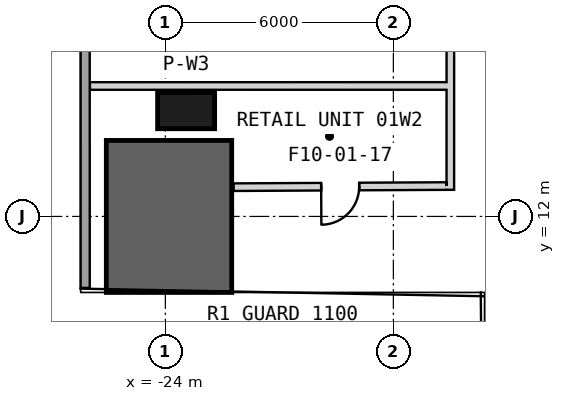
"""IFC4 building model, lengths in metres.
Left out: names, types, materials, properties, quantities, classifications, styles, units other than length and angle.
Written with IfcOpenShell. Run it as: python <this file> out.ifc"""

import sys

from ifc_helpers import new_model, si_unit, direction, frame, frame_2d, origin, origin_2d, place, context, subcontext, project, spatial, polyline, rectangle, outline, extrude, element, fill, save


model = new_model("IFC4")
c1 = context("Model", 3, precision=1e-05, world=origin(), true_north=direction((0.0, 1.0)))
c2 = subcontext(c1, "Body", "Model", "MODEL_VIEW")
j1 = project(units=[si_unit("LENGTHUNIT", "METRE"), si_unit("PLANEANGLEUNIT", "RADIAN")], contexts=[c1])
p1 = place(None, origin())
s1 = spatial("IfcSite", under=j1, at=p1, CompositionType="ELEMENT")
p2 = place(p1, origin())
s2 = spatial("IfcBuilding", under=s1, at=p2, CompositionType="ELEMENT")
p3 = place(p2, frame((0.0, 0.0, 9.0)))
s3 = spatial("IfcBuildingStorey", under=s2, at=p3, CompositionType="ELEMENT", Elevation=9.0)
p4 = place(p3, frame((-23.453, 14.783, 0.0), z_axis=(0.0, 0.0, 1.0), x_axis=(-1.0, 0.0, 0.0)))
e1 = element("IfcColumn", 1, at=p4, inside=s3, PredefinedType="COLUMN", context=c2, shape_type="SweptSolid", body=[
    extrude(rectangle(XDim=1.5, YDim=0.95, at=origin_2d()), origin(), (0.0, 0.0, 1.0), 6.5),
])
p5 = place(p3, origin())
e2 = element("IfcWall", 2, at=p5, inside=s3, PredefinedType="SHEAR", context=c2, shape_type="SweptSolid", body=[
    extrude(outline(polyline([(-25.553, 14.0), (-25.553, 10.0), (-22.253, 10.0), (-22.253, 14.0), (-25.553, 14.0)])), origin(), (0.0, 0.0, 1.0), 6.5),
])
p6 = place(p3, frame((-26.11, 20.685, 0.0), z_axis=(0.0, 0.0, 1.0), x_axis=(6.9319284e-05, -0.999999997597, 0.0)))
e3 = element("IfcWall", 3, at=p6, inside=s3, PredefinedType="SOLIDWALL", context=c2, shape_type="SweptSolid", body=[
    extrude(rectangle(XDim=10.566, YDim=0.24, at=frame_2d((5.283, 0.0))), origin(), (0.0, 0.0, 1.0), 6.2),
])
p7 = place(p3, frame((-16.5, 16.717, 0.0), z_axis=(0.0, 0.0, 1.0), x_axis=(-0.000303914404, -0.999999953818, 0.0)))
e4 = element("IfcWall", 4, at=p7, inside=s3, PredefinedType="PARTITIONING", context=c2, shape_type="SweptSolid", body=[
    extrude(rectangle(XDim=4.017, YDim=0.2, at=frame_2d((2.008, 0.0))), origin(), (0.0, 0.0, 1.0), 5.38),
])
p8 = place(p3, frame((-16.601, 12.8, 0.0), z_axis=(0.0, 0.0, 1.0), x_axis=(-0.999986096706, -0.005273176924, 0.0)))
e5 = element("IfcWall", 5, at=p8, inside=s3, PredefinedType="PARTITIONING", context=c2, shape_type="SweptSolid", body=[
    extrude(rectangle(XDim=5.602, YDim=0.2, at=frame_2d((2.801, 0.0))), origin(), (0.0, 0.0, 1.0), 5.67),
])
p9 = place(p8, frame((2.299, 0.0, 0.0)))
e6 = element("IfcOpeningElement", 6, at=p9, cuts=e5, PredefinedType="OPENING", context=c2, shape_type="SweptSolid", body=[
    extrude(rectangle(XDim=1.0, YDim=2.1, at=frame_2d((0.5, 1.05))), frame((0.0, 0.11, 0.0), z_axis=(0.0, -1.0, 0.0), x_axis=(1.0, 0.0, 0.0)), (0.0, 0.0, 1.0), 0.22),
])
p10 = place(p3, frame((-25.984, 15.432, 0.0), z_axis=(0.0, 0.0, 1.0), x_axis=(0.999999996954, 7.8047765e-05, 0.0)))
e7 = element("IfcWall", 7, at=p10, inside=s3, PredefinedType="PARTITIONING", context=c2, shape_type="SweptSolid", body=[
    extrude(rectangle(XDim=9.384, YDim=0.2, at=frame_2d((4.692, 0.0))), origin(), (0.0, 0.0, 1.0), 5.38),
])
p11 = place(p9, origin())
e8 = element("IfcDoor", 8, at=p11, inside=s3, OperationType="SINGLE_SWING_RIGHT", PredefinedType="USERDEFINED", context=c2, shape_type="SweptSolid", body=[
    extrude(rectangle(XDim=1.0, YDim=2.1, at=frame_2d((0.5, 1.05))), frame((0.0, 0.025, 0.0), z_axis=(0.0, -1.0, 0.0), x_axis=(1.0, 0.0, 0.0)), (0.0, 0.0, 1.0), 0.05),
])
fill(e6, e8)
save(model, sys.argv[1])
